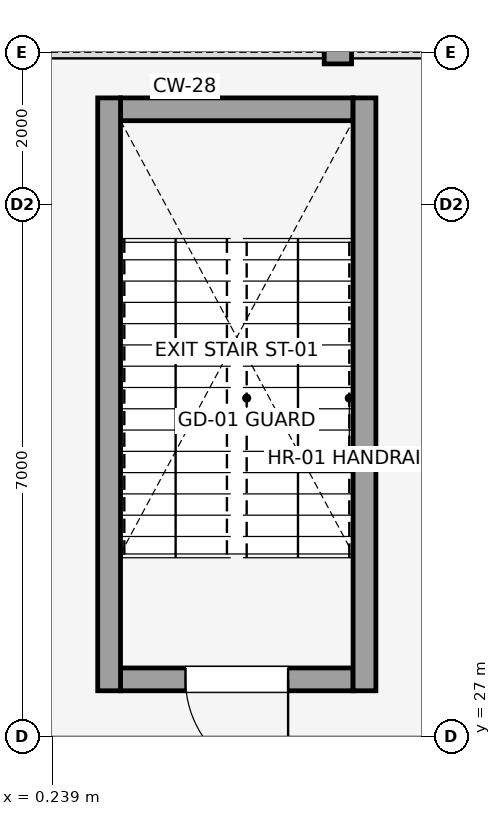
"""IFC4 building model, lengths in metres.
Left out: names, types, materials, properties, quantities, classifications, styles, units other than length and angle.
Written with IfcOpenShell. Run it as: python <this file> out.ifc"""

import sys

from ifc_helpers import new_model, si_unit, direction, frame, frame_2d, origin, place, context, subcontext, project, spatial, rectangle, extrude, element, fill, save


model = new_model("IFC4")
c1 = context("Model", 3, precision=1e-05, world=origin(), true_north=direction((0.0, 1.0)))
c2 = subcontext(c1, "Body", "Model", "MODEL_VIEW")
j1 = project(units=[si_unit("LENGTHUNIT", "METRE"), si_unit("PLANEANGLEUNIT", "RADIAN")], contexts=[c1])
p1 = place(None, origin())
s1 = spatial("IfcSite", under=j1, at=p1, CompositionType="ELEMENT")
p2 = place(p1, origin())
s2 = spatial("IfcBuilding", under=s1, at=p2, CompositionType="ELEMENT")
p3 = place(p2, frame((0.0, 0.0, 9.0)))
s3 = spatial("IfcBuildingStorey", under=s2, at=p3, CompositionType="ELEMENT", Elevation=9.0)
p4 = place(p3, frame((4.18, 36.0, 0.0), z_axis=(0.0, 0.0, 1.0), x_axis=(-1.0, 0.0, 0.0)))
e1 = element("IfcWall", 1, at=p4, inside=s3, PredefinedType="SOLIDWALL", context=c2, shape_type="SweptSolid", body=[
    extrude(rectangle(XDim=0.36, YDim=0.305, at=frame_2d((0.18, 0.0))), origin(), (0.0, 0.0, 1.0), 3.42),
])
p5 = place(p3, frame((4.2, 27.75, 0.0), z_axis=(0.0, 0.0, 1.0), x_axis=(-1.0, 0.0, 0.0)))
e2 = element("IfcWall", 2, at=p5, inside=s3, PredefinedType="SHEAR", context=c2, shape_type="SweptSolid", body=[
    extrude(rectangle(XDim=3.06, YDim=0.3, at=frame_2d((1.53, 0.0))), origin(), (0.0, 0.0, 1.0), 4.8),
])
p6 = place(p5, frame((0.855, 0.0, 0.0)))
e3 = element("IfcOpeningElement", 3, at=p6, cuts=e2, PredefinedType="OPENING", context=c2, shape_type="SweptSolid", body=[
    extrude(rectangle(XDim=1.35, YDim=2.15, at=frame_2d((0.675, 1.075))), frame((0.0, 0.16, 0.0), z_axis=(0.0, -1.0, 0.0), x_axis=(1.0, 0.0, 0.0)), (0.0, 0.0, 1.0), 0.32),
])
p7 = place(p3, frame((4.2, 35.25, 0.0), z_axis=(0.0, 0.0, 1.0), x_axis=(-1.0, 0.0, 0.0)))
e4 = element("IfcWall", 4, at=p7, inside=s3, PredefinedType="SHEAR", context=c2, shape_type="SweptSolid", body=[
    extrude(rectangle(XDim=3.06, YDim=0.3, at=frame_2d((1.53, 0.0))), origin(), (0.0, 0.0, 1.0), 4.8),
])
for number, where, z_axis, x_axis in (
    (5, (4.35, 27.6, 0.0), (0.0, 0.0, 1.0), (0.0, 1.0, 0.0)),
    (6, (0.99, 27.6, 0.0), (0.0, 0.0, 1.0), (0.0, 1.0, 0.0)),
):
    element("IfcWall", number, at=place(p3, frame(where, z_axis=z_axis, x_axis=x_axis)), inside=s3, PredefinedType="SHEAR", context=c2, shape_type="SweptSolid", body=[
        extrude(rectangle(XDim=7.8, YDim=0.3, at=frame_2d((3.9, 0.0))), origin(), (0.0, 0.0, 1.0), 4.8),
    ])
p8 = place(p6, origin())
e7 = element("IfcDoor", 7, at=p8, inside=s3, OperationType="SINGLE_SWING_LEFT", PredefinedType="DOOR", context=c2, shape_type="SweptSolid", body=[
    extrude(rectangle(XDim=1.35, YDim=2.15, at=frame_2d((0.675, 1.075))), frame((0.0, 0.025, 0.0), z_axis=(0.0, -1.0, 0.0), x_axis=(1.0, 0.0, 0.0)), (0.0, 0.0, 1.0), 0.05),
])
fill(e3, e7)
save(model, sys.argv[1])
